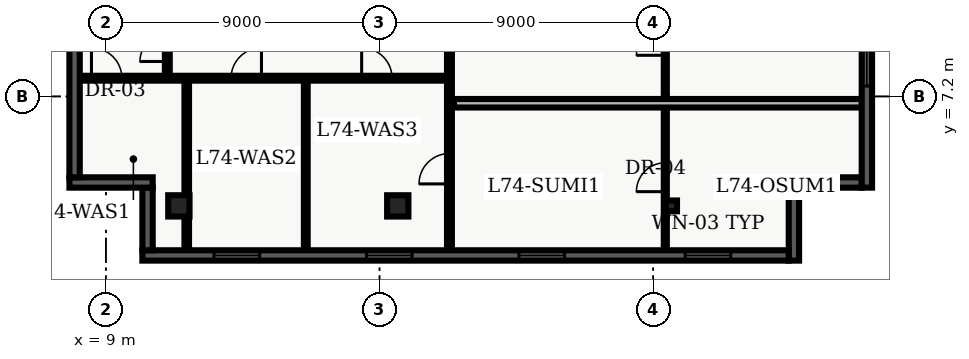
"""IFC4 building model, lengths in metres.
Left out: names, types, materials, properties, quantities, classifications, styles, units other than length and angle.
Written with IfcOpenShell. Run it as: python <this file> out.ifc"""

import sys

from ifc_helpers import new_model, entity, si_unit, converted_unit, direction, frame, origin_with_axes, origin_2d_with_axis, place, context, subcontext, project, spatial, polyline, rectangle, i_section, outline, extrude, element, fill, save


model = new_model("IFC4")
c1 = context("Model", 3, precision=1e-05, world=origin_with_axes(), true_north=direction((0.0, 1.0)))
c2 = subcontext(c1, "Body", "Model", "MODEL_VIEW")
j1 = project(units=[si_unit("LENGTHUNIT", "METRE"), converted_unit("PLANEANGLEUNIT", "DEGREE", entity("IfcPlaneAngleMeasure", 0.017), si_unit("PLANEANGLEUNIT", "RADIAN"), dimensions=[0, 0, 0, 0, 0, 0, 0])], contexts=[c1])
p1 = place(None, origin_with_axes())
s1 = spatial("IfcSite", under=j1, at=p1, CompositionType="ELEMENT")
p2 = place(p1, origin_with_axes())
s2 = spatial("IfcBuilding", under=s1, at=p2, CompositionType="ELEMENT")
p3 = place(p2, frame((0.0, 0.0, 299.7), z_axis=(0.0, 0.0, 1.0), x_axis=(1.0, 0.0, 0.0)))
s3 = spatial("IfcBuildingStorey", under=s2, at=p3, CompositionType="ELEMENT", Elevation=299.7)
for number, where, z_axis, x_axis in (
    (1, (11.4, 3.6, 0.0), (0.0, 0.0, 1.0), (1.0, 0.0, 0.0)),
    (2, (18.6, 3.6, 0.0), (0.0, 0.0, 1.0), (1.0, 0.0, 0.0)),
):
    element("IfcColumn", number, at=place(p3, frame(where, z_axis=z_axis, x_axis=x_axis)), inside=s3, PredefinedType="COLUMN", context=c2, shape_type="SweptSolid", body=[
        extrude(rectangle(XDim=0.7, YDim=0.7, at=origin_2d_with_axis()), origin_with_axes(), (0.0, 0.0, 1.0), 3.9),
    ])
p4 = place(p3, frame((27.6, 3.6, 0.0), z_axis=(0.0, 0.0, 1.0), x_axis=(1.0, 0.0, 0.0)))
e3 = element("IfcColumn", 3, at=p4, inside=s3, PredefinedType="COLUMN", context=c2, shape_type="SweptSolid", body=[
    extrude(i_section(OverallWidth=0.369, OverallDepth=0.356, WebThickness=0.011, FlangeThickness=0.018, FilletRadius=0.018, at=origin_2d_with_axis()), origin_with_axes(), (0.0, 0.0, 1.0), 3.9),
])
p5 = place(p3, frame((8.135, 7.8, 0.0), z_axis=(0.0, 0.0, 1.0), x_axis=(1.0, 0.0, 0.0)))
e4 = element("IfcWall", 4, at=p5, inside=s3, PredefinedType="PARTITIONING", context=c2, shape_type="SweptSolid", body=[
    extrude(outline(polyline([(0.0, -0.08), (12.165, -0.08), (12.165, 0.08), (0.0, 0.08), (0.0, -0.08)])), origin_with_axes(), (0.0, 0.0, 1.0), 2.64),
])
p6 = place(p5, frame((0.89, 0.0, 0.0), z_axis=(0.0, 0.0, 1.0), x_axis=(1.0, 0.0, 0.0)))
e5 = element("IfcOpeningElement", 5, at=p6, cuts=e4, PredefinedType="OPENING", context=c2, shape_type="SweptSolid", body=[
    extrude(rectangle(XDim=1.0, YDim=0.18, at=origin_2d_with_axis()), origin_with_axes(), (0.0, 0.0, 1.0), 2.15),
])
p7 = place(p5, frame((5.482, 0.0, 0.0), z_axis=(0.0, 0.0, 1.0), x_axis=(1.0, 0.0, 0.0)))
e6 = element("IfcOpeningElement", 6, at=p7, cuts=e4, PredefinedType="OPENING", context=c2, shape_type="SweptSolid", body=[
    extrude(rectangle(XDim=1.0, YDim=0.18, at=origin_2d_with_axis()), origin_with_axes(), (0.0, 0.0, 1.0), 2.15),
])
p8 = place(p5, frame((9.777, 0.0, 0.0), z_axis=(0.0, 0.0, 1.0), x_axis=(1.0, 0.0, 0.0)))
e7 = element("IfcOpeningElement", 7, at=p8, cuts=e4, PredefinedType="OPENING", context=c2, shape_type="SweptSolid", body=[
    extrude(rectangle(XDim=1.0, YDim=0.18, at=origin_2d_with_axis()), origin_with_axes(), (0.0, 0.0, 1.0), 2.15),
])
p9 = place(p3, frame((20.3, 2.14, 0.0), z_axis=(0.0, 0.0, 1.0), x_axis=(0.0, 1.0, 0.0)))
e8 = element("IfcWall", 8, at=p9, inside=s3, PredefinedType="PARTITIONING", context=c2, shape_type="SweptSolid", body=[
    extrude(outline(polyline([(0.0, -0.08), (38.36, -0.08), (38.36, 0.08), (0.0, 0.08), (0.0, -0.08)])), origin_with_axes(), (0.0, 0.0, 1.0), 2.64),
])
p10 = place(p9, frame((30.685, 0.0, 0.0), z_axis=(0.0, 0.0, 1.0), x_axis=(1.0, 0.0, 0.0)))
e9 = element("IfcOpeningElement", 9, at=p10, cuts=e8, PredefinedType="OPENING", context=c2, shape_type="SweptSolid", body=[
    extrude(rectangle(XDim=1.05, YDim=0.18, at=origin_2d_with_axis()), origin_with_axes(), (0.0, 0.0, 1.0), 2.15),
])
p11 = place(p9, frame((2.683, 0.0, 0.0), z_axis=(0.0, 0.0, 1.0), x_axis=(1.0, 0.0, 0.0)))
e10 = element("IfcOpeningElement", 10, at=p11, cuts=e8, PredefinedType="OPENING", context=c2, shape_type="SweptSolid", body=[
    extrude(rectangle(XDim=1.0, YDim=0.18, at=origin_2d_with_axis()), origin_with_axes(), (0.0, 0.0, 1.0), 2.15),
])
p12 = place(p9, frame((9.919, 0.0, 0.0), z_axis=(0.0, 0.0, 1.0), x_axis=(1.0, 0.0, 0.0)))
e11 = element("IfcOpeningElement", 11, at=p12, cuts=e8, PredefinedType="OPENING", context=c2, shape_type="SweptSolid", body=[
    extrude(rectangle(XDim=1.0, YDim=0.18, at=origin_2d_with_axis()), origin_with_axes(), (0.0, 0.0, 1.0), 2.15),
])
p13 = place(p9, frame((14.175, 0.0, 0.0), z_axis=(0.0, 0.0, 1.0), x_axis=(1.0, 0.0, 0.0)))
e12 = element("IfcOpeningElement", 12, at=p13, cuts=e8, PredefinedType="OPENING", context=c2, shape_type="SweptSolid", body=[
    extrude(rectangle(XDim=1.0, YDim=0.18, at=origin_2d_with_axis()), origin_with_axes(), (0.0, 0.0, 1.0), 2.15),
])
p14 = place(p9, frame((23.364, 0.0, 0.0), z_axis=(0.0, 0.0, 1.0), x_axis=(1.0, 0.0, 0.0)))
e13 = element("IfcOpeningElement", 13, at=p14, cuts=e8, PredefinedType="OPENING", context=c2, shape_type="SweptSolid", body=[
    extrude(rectangle(XDim=1.0, YDim=0.18, at=origin_2d_with_axis()), origin_with_axes(), (0.0, 0.0, 1.0), 2.15),
])
p15 = place(p3, frame((11.02, 7.8, 0.0), z_axis=(0.0, 0.0, 1.0), x_axis=(0.0, 1.0, 0.0)))
e14 = element("IfcWall", 14, at=p15, inside=s3, PredefinedType="PARTITIONING", context=c2, shape_type="SweptSolid", body=[
    extrude(outline(polyline([(0.0, -0.08), (2.85, -0.08), (2.85, 0.08), (0.0, 0.08), (0.0, -0.08)])), origin_with_axes(), (0.0, 0.0, 1.0), 2.64),
])
p16 = place(p15, frame((1.0, 0.0, 0.0), z_axis=(0.0, 0.0, 1.0), x_axis=(1.0, 0.0, 0.0)))
e15 = element("IfcOpeningElement", 15, at=p16, cuts=e14, PredefinedType="OPENING", context=c2, shape_type="SweptSolid", body=[
    extrude(rectangle(XDim=0.9, YDim=0.18, at=origin_2d_with_axis()), origin_with_axes(), (0.0, 0.0, 1.0), 2.15),
])
p17 = place(p3, frame((11.659, 2.135, 0.0), z_axis=(0.0, 0.0, 1.0), x_axis=(0.0, 1.0, 0.0)))
e16 = element("IfcWall", 16, at=p17, inside=s3, PredefinedType="PARTITIONING", context=c2, shape_type="SweptSolid", body=[
    extrude(outline(polyline([(0.0, -0.075), (5.565, -0.075), (5.565, 0.075), (0.0, 0.075), (0.0, -0.075)])), origin_with_axes(), (0.0, 0.0, 1.0), 2.64),
])
p18 = place(p3, frame((15.575, 2.135, 0.0), z_axis=(0.0, 0.0, 1.0), x_axis=(0.0, 1.0, 0.0)))
e17 = element("IfcWall", 17, at=p18, inside=s3, PredefinedType="PARTITIONING", context=c2, shape_type="SweptSolid", body=[
    extrude(outline(polyline([(0.0, -0.062), (5.565, -0.062), (5.565, 0.062), (0.0, 0.062), (0.0, -0.062)])), origin_with_axes(), (0.0, 0.0, 1.0), 2.64),
])
p19 = place(p3, frame((27.4, 2.135, 0.0), z_axis=(0.0, 0.0, 1.0), x_axis=(0.0, 1.0, 0.0)))
e18 = element("IfcWall", 18, at=p19, inside=s3, PredefinedType="PARTITIONING", context=c2, shape_type="SweptSolid", body=[
    extrude(outline(polyline([(0.0, -0.05), (26.515, -0.05), (26.515, 0.05), (0.0, 0.05), (0.0, -0.05)])), origin_with_axes(), (0.0, 0.0, 1.0), 2.64),
])
p20 = place(p19, frame((2.408, 0.0, 0.0), z_axis=(0.0, 0.0, 1.0), x_axis=(1.0, 0.0, 0.0)))
e19 = element("IfcOpeningElement", 19, at=p20, cuts=e18, PredefinedType="OPENING", context=c2, shape_type="SweptSolid", body=[
    extrude(rectangle(XDim=0.95, YDim=0.12, at=origin_2d_with_axis()), origin_with_axes(), (0.0, 0.0, 1.0), 2.15),
])
p21 = place(p19, frame((6.894, 0.0, 0.0), z_axis=(0.0, 0.0, 1.0), x_axis=(1.0, 0.0, 0.0)))
e20 = element("IfcOpeningElement", 20, at=p21, cuts=e18, PredefinedType="OPENING", context=c2, shape_type="SweptSolid", body=[
    extrude(rectangle(XDim=0.95, YDim=0.12, at=origin_2d_with_axis()), origin_with_axes(), (0.0, 0.0, 1.0), 2.15),
])
p22 = place(p19, frame((13.901, 0.0, 0.0), z_axis=(0.0, 0.0, 1.0), x_axis=(1.0, 0.0, 0.0)))
e21 = element("IfcOpeningElement", 21, at=p22, cuts=e18, PredefinedType="OPENING", context=c2, shape_type="SweptSolid", body=[
    extrude(rectangle(XDim=0.95, YDim=0.12, at=origin_2d_with_axis()), origin_with_axes(), (0.0, 0.0, 1.0), 2.15),
])
p23 = place(p19, frame((22.119, 0.0, 0.0), z_axis=(0.0, 0.0, 1.0), x_axis=(1.0, 0.0, 0.0)))
e22 = element("IfcOpeningElement", 22, at=p23, cuts=e18, PredefinedType="OPENING", context=c2, shape_type="SweptSolid", body=[
    extrude(rectangle(XDim=0.95, YDim=0.12, at=origin_2d_with_axis()), origin_with_axes(), (0.0, 0.0, 1.0), 2.15),
])
p24 = place(p3, frame((20.45, 6.976, 0.0), z_axis=(0.0, 0.0, 1.0), x_axis=(1.0, 0.0, 0.0)))
e23 = element("IfcWall", 23, at=p24, inside=s3, PredefinedType="PARTITIONING", context=c2, shape_type="SweptSolid", body=[
    extrude(outline(polyline([(0.0, -0.14), (13.415, -0.14), (13.415, 0.14), (0.0, 0.14), (0.0, -0.14)])), origin_with_axes(), (0.0, 0.0, 1.0), 2.64),
])
p25 = place(p3, frame((33.86, 4.37, 0.0), z_axis=(0.0, 0.0, 1.0), x_axis=(-1.0, 0.0, 0.0)))
e24 = element("IfcWall", 24, at=p25, inside=s3, PredefinedType="SOLIDWALL", context=c2, shape_type="SweptSolid", body=[
    extrude(outline(polyline([(0.0, -0.17), (2.06, -0.17), (2.06, 0.17), (0.0, 0.17), (0.0, -0.17)])), origin_with_axes(), (0.0, 0.0, 1.0), 3.6),
])
p26 = place(p3, frame((31.63, 4.54, 0.0), z_axis=(0.0, 0.0, 1.0), x_axis=(0.0, -1.0, 0.0)))
e25 = element("IfcWall", 25, at=p26, inside=s3, PredefinedType="SOLIDWALL", context=c2, shape_type="SweptSolid", body=[
    extrude(outline(polyline([(0.0, -0.17), (2.74, -0.17), (2.74, 0.17), (0.0, 0.17), (0.0, -0.17)])), origin_with_axes(), (0.0, 0.0, 1.0), 3.6),
])
p27 = place(p3, frame((31.46, 1.97, 0.0), z_axis=(0.0, 0.0, 1.0), x_axis=(-1.0, 0.0, 0.0)))
e26 = element("IfcWall", 26, at=p27, inside=s3, PredefinedType="SOLIDWALL", context=c2, shape_type="SweptSolid", body=[
    extrude(outline(polyline([(0.0, -0.17), (21.26, -0.17), (21.26, 0.17), (0.0, 0.17), (0.0, -0.17)])), origin_with_axes(), (0.0, 0.0, 1.0), 3.6),
])
p28 = place(p27, frame((2.658, 0.0, 0.45), z_axis=(0.0, 0.0, 1.0), x_axis=(1.0, 0.0, 0.0)))
e27 = element("IfcOpeningElement", 27, at=p28, cuts=e26, PredefinedType="OPENING", context=c2, shape_type="SweptSolid", body=[
    extrude(rectangle(XDim=1.5, YDim=0.36, at=origin_2d_with_axis()), origin_with_axes(), (0.0, 0.0, 1.0), 2.1),
])
p29 = place(p27, frame((8.123, 0.0, 0.45), z_axis=(0.0, 0.0, 1.0), x_axis=(1.0, 0.0, 0.0)))
e28 = element("IfcOpeningElement", 28, at=p29, cuts=e26, PredefinedType="OPENING", context=c2, shape_type="SweptSolid", body=[
    extrude(rectangle(XDim=1.5, YDim=0.36, at=origin_2d_with_axis()), origin_with_axes(), (0.0, 0.0, 1.0), 2.1),
])
p30 = place(p27, frame((13.138, 0.0, 0.45), z_axis=(0.0, 0.0, 1.0), x_axis=(1.0, 0.0, 0.0)))
e29 = element("IfcOpeningElement", 29, at=p30, cuts=e26, PredefinedType="OPENING", context=c2, shape_type="SweptSolid", body=[
    extrude(rectangle(XDim=1.5, YDim=0.36, at=origin_2d_with_axis()), origin_with_axes(), (0.0, 0.0, 1.0), 2.1),
])
p31 = place(p27, frame((18.153, 0.0, 0.45), z_axis=(0.0, 0.0, 1.0), x_axis=(1.0, 0.0, 0.0)))
e30 = element("IfcOpeningElement", 30, at=p31, cuts=e26, PredefinedType="OPENING", context=c2, shape_type="SweptSolid", body=[
    extrude(rectangle(XDim=1.5, YDim=0.36, at=origin_2d_with_axis()), origin_with_axes(), (0.0, 0.0, 1.0), 2.1),
])
p32 = place(p3, frame((10.37, 2.14, 0.0), z_axis=(0.0, 0.0, 1.0), x_axis=(0.0, 1.0, 0.0)))
e31 = element("IfcWall", 31, at=p32, inside=s3, PredefinedType="SOLIDWALL", context=c2, shape_type="SweptSolid", body=[
    extrude(outline(polyline([(0.0, -0.17), (2.06, -0.17), (2.06, 0.17), (0.0, 0.17), (0.0, -0.17)])), origin_with_axes(), (0.0, 0.0, 1.0), 3.6),
])
p33 = place(p3, frame((10.54, 4.37, 0.0), z_axis=(0.0, 0.0, 1.0), x_axis=(-1.0, 0.0, 0.0)))
e32 = element("IfcWall", 32, at=p33, inside=s3, PredefinedType="SOLIDWALL", context=c2, shape_type="SweptSolid", body=[
    extrude(outline(polyline([(0.0, -0.17), (2.74, -0.17), (2.74, 0.17), (0.0, 0.17), (0.0, -0.17)])), origin_with_axes(), (0.0, 0.0, 1.0), 3.6),
])
p34 = place(p3, frame((7.97, 4.54, 0.0), z_axis=(0.0, 0.0, 1.0), x_axis=(0.0, 1.0, 0.0)))
e33 = element("IfcWall", 33, at=p34, inside=s3, PredefinedType="SOLIDWALL", context=c2, shape_type="SweptSolid", body=[
    extrude(outline(polyline([(0.0, -0.17), (39.86, -0.17), (39.86, 0.17), (0.0, 0.17), (0.0, -0.17)])), origin_with_axes(), (0.0, 0.0, 1.0), 3.6),
])
p35 = place(p34, frame((7.849, 0.0, 0.45), z_axis=(0.0, 0.0, 1.0), x_axis=(1.0, 0.0, 0.0)))
e34 = element("IfcOpeningElement", 34, at=p35, cuts=e33, PredefinedType="OPENING", context=c2, shape_type="SweptSolid", body=[
    extrude(rectangle(XDim=1.5, YDim=0.36, at=origin_2d_with_axis()), origin_with_axes(), (0.0, 0.0, 1.0), 2.1),
])
p36 = place(p34, frame((12.681, 0.0, 0.45), z_axis=(0.0, 0.0, 1.0), x_axis=(1.0, 0.0, 0.0)))
e35 = element("IfcOpeningElement", 35, at=p36, cuts=e33, PredefinedType="OPENING", context=c2, shape_type="SweptSolid", body=[
    extrude(rectangle(XDim=1.5, YDim=0.36, at=origin_2d_with_axis()), origin_with_axes(), (0.0, 0.0, 1.0), 2.1),
])
p37 = place(p34, frame((17.514, 0.0, 0.45), z_axis=(0.0, 0.0, 1.0), x_axis=(1.0, 0.0, 0.0)))
e36 = element("IfcOpeningElement", 36, at=p37, cuts=e33, PredefinedType="OPENING", context=c2, shape_type="SweptSolid", body=[
    extrude(rectangle(XDim=1.5, YDim=0.36, at=origin_2d_with_axis()), origin_with_axes(), (0.0, 0.0, 1.0), 2.1),
])
p38 = place(p34, frame((23.196, 0.0, 0.45), z_axis=(0.0, 0.0, 1.0), x_axis=(1.0, 0.0, 0.0)))
e37 = element("IfcOpeningElement", 37, at=p38, cuts=e33, PredefinedType="OPENING", context=c2, shape_type="SweptSolid", body=[
    extrude(rectangle(XDim=1.5, YDim=0.36, at=origin_2d_with_axis()), origin_with_axes(), (0.0, 0.0, 1.0), 2.1),
])
p39 = place(p34, frame((27.179, 0.0, 0.45), z_axis=(0.0, 0.0, 1.0), x_axis=(1.0, 0.0, 0.0)))
e38 = element("IfcOpeningElement", 38, at=p39, cuts=e33, PredefinedType="OPENING", context=c2, shape_type="SweptSolid", body=[
    extrude(rectangle(XDim=1.5, YDim=0.36, at=origin_2d_with_axis()), origin_with_axes(), (0.0, 0.0, 1.0), 2.1),
])
p40 = place(p34, frame((32.011, 0.0, 0.45), z_axis=(0.0, 0.0, 1.0), x_axis=(1.0, 0.0, 0.0)))
e39 = element("IfcOpeningElement", 39, at=p40, cuts=e33, PredefinedType="OPENING", context=c2, shape_type="SweptSolid", body=[
    extrude(rectangle(XDim=1.5, YDim=0.36, at=origin_2d_with_axis()), origin_with_axes(), (0.0, 0.0, 1.0), 2.1),
])
p41 = place(p34, frame((37.294, 0.0, 0.45), z_axis=(0.0, 0.0, 1.0), x_axis=(1.0, 0.0, 0.0)))
e40 = element("IfcOpeningElement", 40, at=p41, cuts=e33, PredefinedType="OPENING", context=c2, shape_type="SweptSolid", body=[
    extrude(rectangle(XDim=1.5, YDim=0.36, at=origin_2d_with_axis()), origin_with_axes(), (0.0, 0.0, 1.0), 2.1),
])
p42 = place(p3, frame((34.03, 21.26, 0.0), z_axis=(0.0, 0.0, 1.0), x_axis=(0.0, -1.0, 0.0)))
e41 = element("IfcWall", 41, at=p42, inside=s3, PredefinedType="SOLIDWALL", context=c2, shape_type="SweptSolid", body=[
    extrude(outline(polyline([(0.0, -0.17), (17.06, -0.17), (17.06, 0.17), (0.0, 0.17), (0.0, -0.17)])), origin_with_axes(), (0.0, 0.0, 1.0), 3.6),
])
p43 = place(p42, frame((3.243, 0.0, 0.45), z_axis=(0.0, 0.0, 1.0), x_axis=(1.0, 0.0, 0.0)))
e42 = element("IfcOpeningElement", 42, at=p43, cuts=e41, PredefinedType="OPENING", context=c2, shape_type="SweptSolid", body=[
    extrude(rectangle(XDim=1.5, YDim=0.36, at=origin_2d_with_axis()), origin_with_axes(), (0.0, 0.0, 1.0), 2.1),
])
p44 = place(p42, frame((12.967, 0.0, 0.45), z_axis=(0.0, 0.0, 1.0), x_axis=(1.0, 0.0, 0.0)))
e43 = element("IfcOpeningElement", 43, at=p44, cuts=e41, PredefinedType="OPENING", context=c2, shape_type="SweptSolid", body=[
    extrude(rectangle(XDim=1.5, YDim=0.36, at=origin_2d_with_axis()), origin_with_axes(), (0.0, 0.0, 1.0), 2.1),
])
p45 = place(p15, frame((1.0, 0.0, 0.0), z_axis=(0.0, 0.0, 1.0), x_axis=(1.0, 0.0, 0.0)))
e44 = element("IfcDoor", 44, at=p45, inside=s3, OperationType="SINGLE_SWING_LEFT", PredefinedType="DOOR", context=c2, shape_type="SweptSolid", body=[
    extrude(rectangle(XDim=0.9, YDim=0.09, at=origin_2d_with_axis()), origin_with_axes(), (0.0, 0.0, 1.0), 2.15),
])
fill(e15, e44)
p46 = place(p5, frame((0.89, 0.0, 0.0), z_axis=(0.0, 0.0, 1.0), x_axis=(1.0, 0.0, 0.0)))
e45 = element("IfcDoor", 45, at=p46, inside=s3, OperationType="SINGLE_SWING_LEFT", PredefinedType="DOOR", context=c2, shape_type="SweptSolid", body=[
    extrude(rectangle(XDim=1.0, YDim=0.09, at=origin_2d_with_axis()), origin_with_axes(), (0.0, 0.0, 1.0), 2.15),
])
fill(e5, e45)
p47 = place(p5, frame((5.482, 0.0, 0.0), z_axis=(0.0, 0.0, 1.0), x_axis=(1.0, 0.0, 0.0)))
e46 = element("IfcDoor", 46, at=p47, inside=s3, OperationType="SINGLE_SWING_RIGHT", PredefinedType="DOOR", context=c2, shape_type="SweptSolid", body=[
    extrude(rectangle(XDim=1.0, YDim=0.09, at=origin_2d_with_axis()), origin_with_axes(), (0.0, 0.0, 1.0), 2.15),
])
fill(e6, e46)
p48 = place(p5, frame((9.777, 0.0, 0.0), z_axis=(0.0, 0.0, 1.0), x_axis=(1.0, 0.0, 0.0)))
e47 = element("IfcDoor", 47, at=p48, inside=s3, OperationType="SINGLE_SWING_LEFT", PredefinedType="DOOR", context=c2, shape_type="SweptSolid", body=[
    extrude(rectangle(XDim=1.0, YDim=0.09, at=origin_2d_with_axis()), origin_with_axes(), (0.0, 0.0, 1.0), 2.15),
])
fill(e7, e47)
p49 = place(p19, frame((2.408, 0.0, 0.0), z_axis=(0.0, 0.0, 1.0), x_axis=(1.0, 0.0, 0.0)))
e48 = element("IfcDoor", 48, at=p49, inside=s3, OperationType="SINGLE_SWING_LEFT", PredefinedType="DOOR", context=c2, shape_type="SweptSolid", body=[
    extrude(rectangle(XDim=0.95, YDim=0.06, at=origin_2d_with_axis()), origin_with_axes(), (0.0, 0.0, 1.0), 2.15),
])
fill(e19, e48)
p50 = place(p9, frame((2.683, 0.0, 0.0), z_axis=(0.0, 0.0, 1.0), x_axis=(1.0, 0.0, 0.0)))
e49 = element("IfcDoor", 49, at=p50, inside=s3, OperationType="SINGLE_SWING_LEFT", PredefinedType="DOOR", context=c2, shape_type="SweptSolid", body=[
    extrude(rectangle(XDim=1.0, YDim=0.09, at=origin_2d_with_axis()), origin_with_axes(), (0.0, 0.0, 1.0), 2.15),
])
fill(e10, e49)
p51 = place(p19, frame((6.894, 0.0, 0.0), z_axis=(0.0, 0.0, 1.0), x_axis=(1.0, 0.0, 0.0)))
e50 = element("IfcDoor", 50, at=p51, inside=s3, OperationType="SINGLE_SWING_LEFT", PredefinedType="DOOR", context=c2, shape_type="SweptSolid", body=[
    extrude(rectangle(XDim=0.95, YDim=0.06, at=origin_2d_with_axis()), origin_with_axes(), (0.0, 0.0, 1.0), 2.15),
])
fill(e20, e50)
p52 = place(p27, frame((2.658, 0.0, 0.45), z_axis=(0.0, 0.0, 1.0), x_axis=(1.0, 0.0, 0.0)))
e51 = element("IfcWindow", 51, at=p52, inside=s3, PredefinedType="WINDOW", context=c2, shape_type="SweptSolid", body=[
    extrude(rectangle(XDim=1.5, YDim=0.09, at=origin_2d_with_axis()), origin_with_axes(), (0.0, 0.0, 1.0), 2.1),
])
fill(e27, e51)
p53 = place(p27, frame((8.123, 0.0, 0.45), z_axis=(0.0, 0.0, 1.0), x_axis=(1.0, 0.0, 0.0)))
e52 = element("IfcWindow", 52, at=p53, inside=s3, PredefinedType="WINDOW", context=c2, shape_type="SweptSolid", body=[
    extrude(rectangle(XDim=1.5, YDim=0.09, at=origin_2d_with_axis()), origin_with_axes(), (0.0, 0.0, 1.0), 2.1),
])
fill(e28, e52)
p54 = place(p27, frame((13.138, 0.0, 0.45), z_axis=(0.0, 0.0, 1.0), x_axis=(1.0, 0.0, 0.0)))
e53 = element("IfcWindow", 53, at=p54, inside=s3, PredefinedType="WINDOW", context=c2, shape_type="SweptSolid", body=[
    extrude(rectangle(XDim=1.5, YDim=0.09, at=origin_2d_with_axis()), origin_with_axes(), (0.0, 0.0, 1.0), 2.1),
])
fill(e29, e53)
p55 = place(p27, frame((18.153, 0.0, 0.45), z_axis=(0.0, 0.0, 1.0), x_axis=(1.0, 0.0, 0.0)))
e54 = element("IfcWindow", 54, at=p55, inside=s3, PredefinedType="WINDOW", context=c2, shape_type="SweptSolid", body=[
    extrude(rectangle(XDim=1.5, YDim=0.09, at=origin_2d_with_axis()), origin_with_axes(), (0.0, 0.0, 1.0), 2.1),
])
fill(e30, e54)
p56 = place(p42, frame((12.967, 0.0, 0.45), z_axis=(0.0, 0.0, 1.0), x_axis=(1.0, 0.0, 0.0)))
e55 = element("IfcWindow", 55, at=p56, inside=s3, PredefinedType="WINDOW", context=c2, shape_type="SweptSolid", body=[
    extrude(rectangle(XDim=1.5, YDim=0.09, at=origin_2d_with_axis()), origin_with_axes(), (0.0, 0.0, 1.0), 2.1),
])
fill(e43, e55)
save(model, sys.argv[1])
